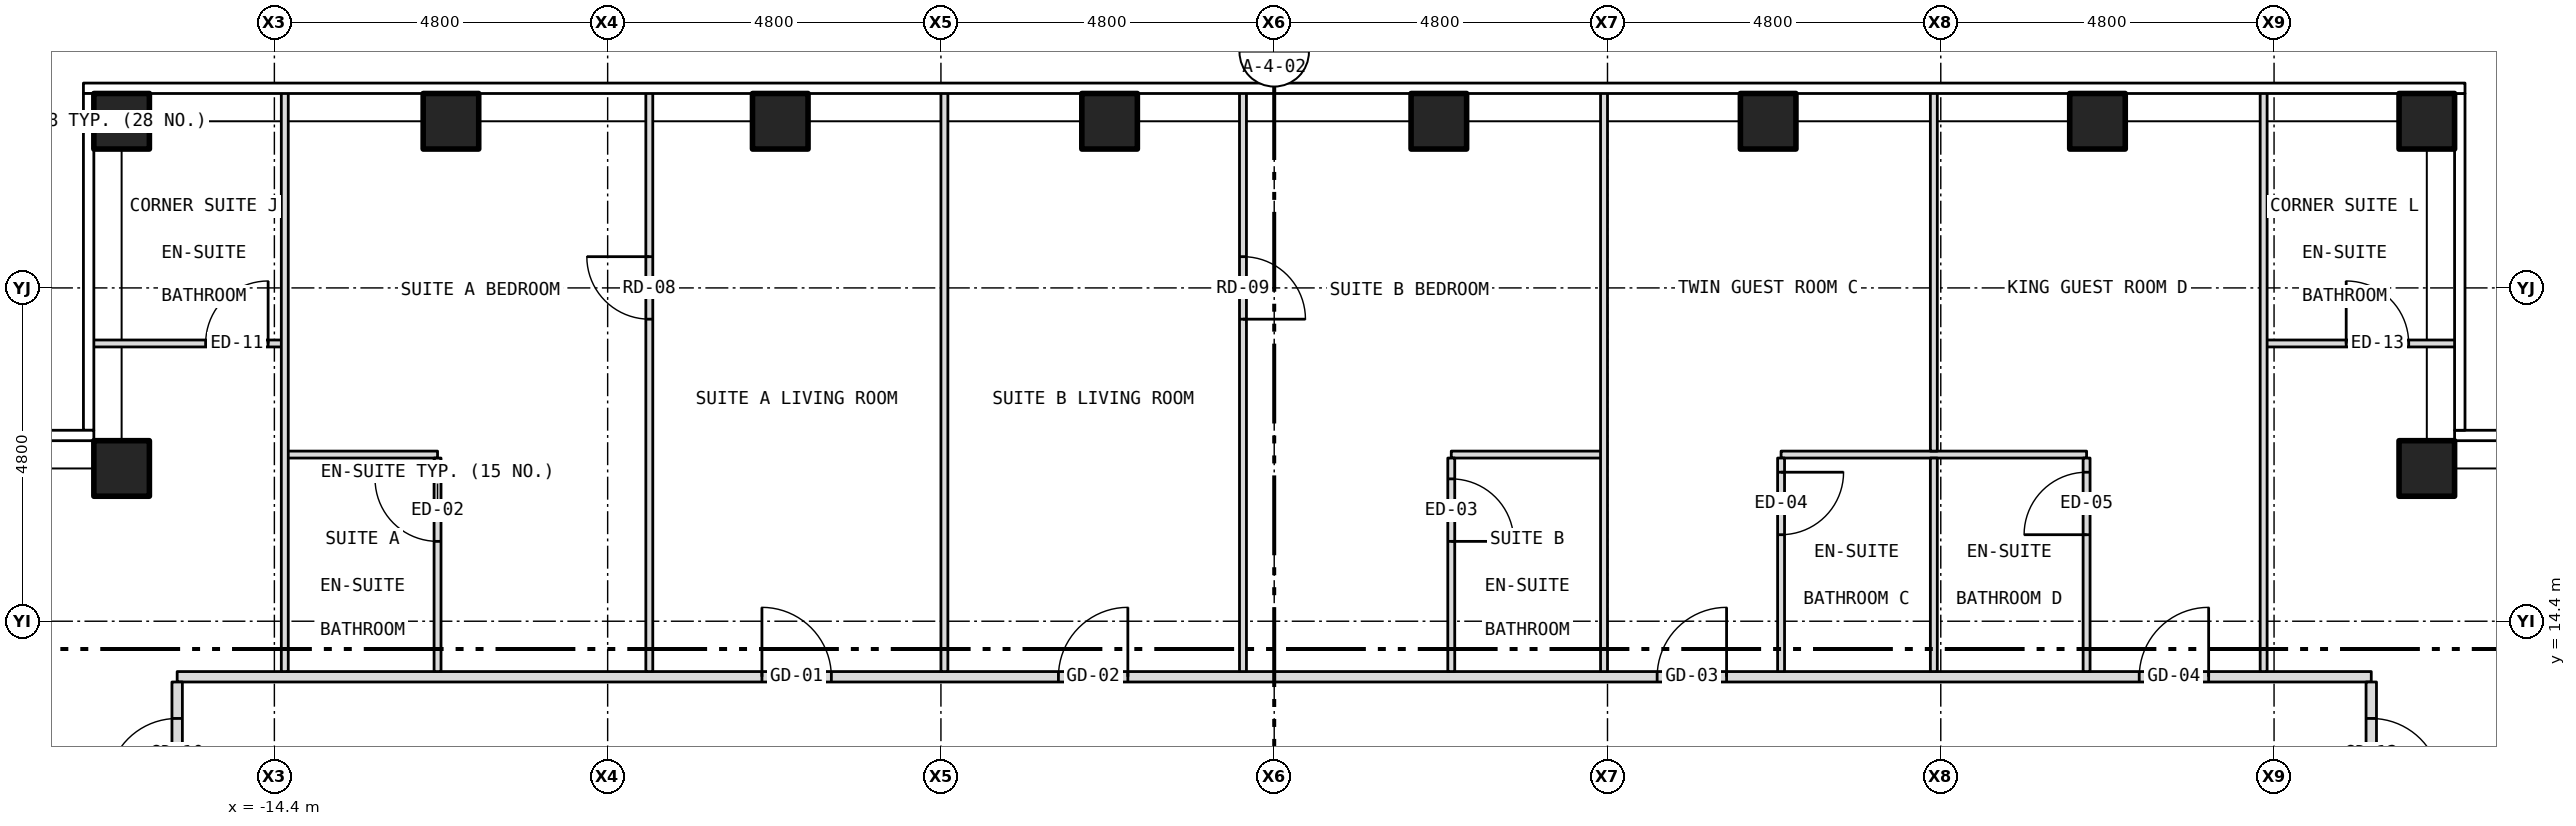
"""IFC4 building model, lengths in metres.
Left out: names, types, materials, properties, quantities, classifications, styles, units other than length and angle.
Written with IfcOpenShell. Run it as: python <this file> out.ifc"""

import sys

from ifc_helpers import new_model, si_unit, direction, frame, frame_2d, origin, origin_2d, place, context, subcontext, project, spatial, rectangle, hollow_rectangle, extrude, element, fill, save


model = new_model("IFC4")
c1 = context("Model", 3, precision=1e-05, world=origin(), true_north=direction((0.0, 1.0)))
c2 = subcontext(c1, "Body", "Model", "MODEL_VIEW")
j1 = project(units=[si_unit("LENGTHUNIT", "METRE"), si_unit("PLANEANGLEUNIT", "RADIAN")], contexts=[c1])
p1 = place(None, origin())
s1 = spatial("IfcSite", under=j1, at=p1, CompositionType="ELEMENT")
p2 = place(p1, origin())
s2 = spatial("IfcBuilding", under=s1, at=p2, CompositionType="ELEMENT")
p3 = place(p2, frame((0.0, 0.0, 158.5)))
s3 = spatial("IfcBuildingStorey", under=s2, at=p3, CompositionType="ELEMENT", Elevation=158.5)
for number, where, z_axis, x_axis in (
    (1, (-16.6, 21.6, -0.15), (0.0, 0.0, 1.0), (1.0, 0.0, 0.0)),
    (2, (-11.857, 21.6, -0.15), (0.0, 0.0, 1.0), (1.0, 0.0, 0.0)),
    (3, (-7.114, 21.6, -0.15), (0.0, 0.0, 1.0), (1.0, 0.0, 0.0)),
    (4, (-2.371, 21.6, -0.15), (0.0, 0.0, 1.0), (1.0, 0.0, 0.0)),
    (5, (2.371, 21.6, -0.15), (0.0, 0.0, 1.0), (1.0, 0.0, 0.0)),
    (6, (7.114, 21.6, -0.15), (0.0, 0.0, 1.0), (1.0, 0.0, 0.0)),
    (7, (11.857, 21.6, -0.15), (0.0, 0.0, 1.0), (1.0, 0.0, 0.0)),
    (8, (16.6, 21.6, -0.15), (0.0, 0.0, 1.0), (1.0, 0.0, 0.0)),
    (9, (-16.6, 16.6, -0.15), (0.0, 0.0, 1.0), (1.0, 0.0, 0.0)),
    (10, (16.6, 16.6, -0.15), (0.0, 0.0, 1.0), (1.0, 0.0, 0.0)),
):
    element("IfcColumn", number, at=place(p3, frame(where, z_axis=z_axis, x_axis=x_axis)), inside=s3, PredefinedType="COLUMN", context=c2, shape_type="SweptSolid", body=[
        extrude(hollow_rectangle(XDim=0.8, YDim=0.8, WallThickness=0.045, at=origin_2d()), origin(), (0.0, 0.0, 1.0), 3.5),
    ])
p4 = place(p3, frame((-15.8, 13.6, 0.0), z_axis=(0.0, 0.0, 1.0), x_axis=(1.0, 0.0, 0.0)))
e11 = element("IfcWall", 11, at=p4, inside=s3, PredefinedType="PARTITIONING", context=c2, shape_type="SweptSolid", body=[
    extrude(rectangle(XDim=31.6, YDim=0.15, at=frame_2d((15.8, 0.0))), origin(), (0.0, 0.0, 1.0), 3.35),
])
p5 = place(p4, frame((8.422, 0.0, 0.0)))
e12 = element("IfcOpeningElement", 12, at=p5, cuts=e11, PredefinedType="OPENING", context=c2, shape_type="SweptSolid", body=[
    extrude(rectangle(XDim=1.0, YDim=2.1, at=frame_2d((0.5, 1.05))), frame((0.0, 0.087, 0.0), z_axis=(0.0, -1.0, 0.0), x_axis=(1.0, 0.0, 0.0)), (0.0, 0.0, 1.0), 0.174),
])
p6 = place(p4, frame((12.692, 0.0, 0.0)))
e13 = element("IfcOpeningElement", 13, at=p6, cuts=e11, PredefinedType="OPENING", context=c2, shape_type="SweptSolid", body=[
    extrude(rectangle(XDim=1.0, YDim=2.1, at=frame_2d((0.5, 1.05))), frame((0.0, 0.087, 0.0), z_axis=(0.0, -1.0, 0.0), x_axis=(1.0, 0.0, 0.0)), (0.0, 0.0, 1.0), 0.174),
])
p7 = place(p4, frame((21.315, 0.0, 0.0)))
e14 = element("IfcOpeningElement", 14, at=p7, cuts=e11, PredefinedType="OPENING", context=c2, shape_type="SweptSolid", body=[
    extrude(rectangle(XDim=1.0, YDim=2.1, at=frame_2d((0.5, 1.05))), frame((0.0, 0.087, 0.0), z_axis=(0.0, -1.0, 0.0), x_axis=(1.0, 0.0, 0.0)), (0.0, 0.0, 1.0), 0.174),
])
p8 = place(p4, frame((28.258, 0.0, 0.0)))
e15 = element("IfcOpeningElement", 15, at=p8, cuts=e11, PredefinedType="OPENING", context=c2, shape_type="SweptSolid", body=[
    extrude(rectangle(XDim=1.0, YDim=2.1, at=frame_2d((0.5, 1.05))), frame((0.0, 0.087, 0.0), z_axis=(0.0, -1.0, 0.0), x_axis=(1.0, 0.0, 0.0)), (0.0, 0.0, 1.0), 0.174),
])
for number, where, z_axis, x_axis in (
    (16, (-14.25, 16.8, 0.0), (0.0, 0.0, 1.0), (1.0, 0.0, 0.0)),
    (17, (2.55, 16.8, 0.0), (0.0, 0.0, 1.0), (1.0, 0.0, 0.0)),
):
    element("IfcWall", number, at=place(p3, frame(where, z_axis=z_axis, x_axis=x_axis)), inside=s3, PredefinedType="PARTITIONING", context=c2, shape_type="SweptSolid", body=[
        extrude(rectangle(XDim=2.2, YDim=0.1, at=frame_2d((1.1, 0.0))), origin(), (0.0, 0.0, 1.0), 3.35),
    ])
p9 = place(p3, frame((7.3, 16.8, 0.0), z_axis=(0.0, 0.0, 1.0), x_axis=(1.0, 0.0, 0.0)))
e18 = element("IfcWall", 18, at=p9, inside=s3, PredefinedType="PARTITIONING", context=c2, shape_type="SweptSolid", body=[
    extrude(rectangle(XDim=4.4, YDim=0.1, at=frame_2d((2.2, 0.0))), origin(), (0.0, 0.0, 1.0), 3.35),
])
p10 = place(p3, frame((-17.03, 18.4, 0.0), z_axis=(0.0, 0.0, 1.0), x_axis=(1.0, 0.0, 0.0)))
e19 = element("IfcWall", 19, at=p10, inside=s3, PredefinedType="PARTITIONING", context=c2, shape_type="SweptSolid", body=[
    extrude(rectangle(XDim=2.78, YDim=0.1, at=frame_2d((1.39, 0.0))), origin(), (0.0, 0.0, 1.0), 3.35),
])
p11 = place(p10, frame((1.64, 0.0, 0.0)))
e20 = element("IfcOpeningElement", 20, at=p11, cuts=e19, PredefinedType="OPENING", context=c2, shape_type="SweptSolid", body=[
    extrude(rectangle(XDim=0.9, YDim=2.1, at=frame_2d((0.45, 1.05))), frame((0.0, 0.062, 0.0), z_axis=(0.0, -1.0, 0.0), x_axis=(1.0, 0.0, 0.0)), (0.0, 0.0, 1.0), 0.124),
])
p12 = place(p3, frame((14.25, 18.4, 0.0), z_axis=(0.0, 0.0, 1.0), x_axis=(1.0, 0.0, 0.0)))
e21 = element("IfcWall", 21, at=p12, inside=s3, PredefinedType="PARTITIONING", context=c2, shape_type="SweptSolid", body=[
    extrude(rectangle(XDim=2.78, YDim=0.1, at=frame_2d((1.39, 0.0))), origin(), (0.0, 0.0, 1.0), 3.35),
])
p13 = place(p12, frame((1.189, 0.0, 0.0)))
e22 = element("IfcOpeningElement", 22, at=p13, cuts=e21, PredefinedType="OPENING", context=c2, shape_type="SweptSolid", body=[
    extrude(rectangle(XDim=0.9, YDim=2.1, at=frame_2d((0.45, 1.05))), frame((0.0, 0.062, 0.0), z_axis=(0.0, -1.0, 0.0), x_axis=(1.0, 0.0, 0.0)), (0.0, 0.0, 1.0), 0.124),
])
p14 = place(p3, frame((-15.8, 10.92, 0.0), z_axis=(0.0, 0.0, 1.0), x_axis=(0.0, 1.0, 0.0)))
e23 = element("IfcWall", 23, at=p14, inside=s3, PredefinedType="PARTITIONING", context=c2, shape_type="SweptSolid", body=[
    extrude(rectangle(XDim=2.605, YDim=0.15, at=frame_2d((1.302, 0.0))), origin(), (0.0, 0.0, 1.0), 3.35),
])
p15 = place(p14, frame((1.08, 0.0, 0.0)))
e24 = element("IfcOpeningElement", 24, at=p15, cuts=e23, PredefinedType="OPENING", context=c2, shape_type="SweptSolid", body=[
    extrude(rectangle(XDim=1.0, YDim=2.1, at=frame_2d((0.5, 1.05))), frame((0.0, 0.087, 0.0), z_axis=(0.0, -1.0, 0.0), x_axis=(1.0, 0.0, 0.0)), (0.0, 0.0, 1.0), 0.174),
])
p16 = place(p3, frame((-14.25, 13.675, 0.0), z_axis=(0.0, 0.0, 1.0), x_axis=(0.0, 1.0, 0.0)))
e25 = element("IfcWall", 25, at=p16, inside=s3, PredefinedType="PARTITIONING", context=c2, shape_type="SweptSolid", body=[
    extrude(rectangle(XDim=8.355, YDim=0.1, at=frame_2d((4.177, 0.0))), origin(), (0.0, 0.0, 1.0), 2.817),
])
p17 = place(p3, frame((-12.05, 13.675, 0.0), z_axis=(0.0, 0.0, 1.0), x_axis=(0.0, 1.0, 0.0)))
e26 = element("IfcWall", 26, at=p17, inside=s3, PredefinedType="PARTITIONING", context=c2, shape_type="SweptSolid", body=[
    extrude(rectangle(XDim=3.075, YDim=0.1, at=frame_2d((1.538, 0.0))), origin(), (0.0, 0.0, 1.0), 3.35),
])
p18 = place(p17, frame((1.875, 0.0, 0.0)))
e27 = element("IfcOpeningElement", 27, at=p18, cuts=e26, PredefinedType="OPENING", context=c2, shape_type="SweptSolid", body=[
    extrude(rectangle(XDim=0.9, YDim=2.1, at=frame_2d((0.45, 1.05))), frame((0.0, 0.062, 0.0), z_axis=(0.0, -1.0, 0.0), x_axis=(1.0, 0.0, 0.0)), (0.0, 0.0, 1.0), 0.124),
])
p19 = place(p3, frame((-9.0, 13.675, 0.0), z_axis=(0.0, 0.0, 1.0), x_axis=(0.0, 1.0, 0.0)))
e28 = element("IfcWall", 28, at=p19, inside=s3, PredefinedType="PARTITIONING", context=c2, shape_type="SweptSolid", body=[
    extrude(rectangle(XDim=8.355, YDim=0.1, at=frame_2d((4.177, 0.0))), origin(), (0.0, 0.0, 1.0), 3.35),
])
p20 = place(p19, frame((5.075, 0.0, 0.0)))
e29 = element("IfcOpeningElement", 29, at=p20, cuts=e28, PredefinedType="OPENING", context=c2, shape_type="SweptSolid", body=[
    extrude(rectangle(XDim=0.9, YDim=2.1, at=frame_2d((0.45, 1.05))), frame((0.0, 0.062, 0.0), z_axis=(0.0, -1.0, 0.0), x_axis=(1.0, 0.0, 0.0)), (0.0, 0.0, 1.0), 0.124),
])
p21 = place(p3, frame((-4.75, 13.675, 0.0), z_axis=(0.0, 0.0, 1.0), x_axis=(0.0, 1.0, 0.0)))
e30 = element("IfcWall", 30, at=p21, inside=s3, PredefinedType="PARTITIONING", context=c2, shape_type="SweptSolid", body=[
    extrude(rectangle(XDim=8.355, YDim=0.1, at=frame_2d((4.177, 0.0))), origin(), (0.0, 0.0, 1.0), 2.817),
])
p22 = place(p3, frame((-0.45, 13.675, 0.0), z_axis=(0.0, 0.0, 1.0), x_axis=(0.0, 1.0, 0.0)))
e31 = element("IfcWall", 31, at=p22, inside=s3, PredefinedType="PARTITIONING", context=c2, shape_type="SweptSolid", body=[
    extrude(rectangle(XDim=8.355, YDim=0.1, at=frame_2d((4.177, 0.0))), origin(), (0.0, 0.0, 1.0), 3.35),
])
p23 = place(p22, frame((5.075, 0.0, 0.0)))
e32 = element("IfcOpeningElement", 32, at=p23, cuts=e31, PredefinedType="OPENING", context=c2, shape_type="SweptSolid", body=[
    extrude(rectangle(XDim=0.9, YDim=2.1, at=frame_2d((0.45, 1.05))), frame((0.0, 0.062, 0.0), z_axis=(0.0, -1.0, 0.0), x_axis=(1.0, 0.0, 0.0)), (0.0, 0.0, 1.0), 0.124),
])
p24 = place(p3, frame((2.55, 13.675, 0.0), z_axis=(0.0, 0.0, 1.0), x_axis=(0.0, 1.0, 0.0)))
e33 = element("IfcWall", 33, at=p24, inside=s3, PredefinedType="PARTITIONING", context=c2, shape_type="SweptSolid", body=[
    extrude(rectangle(XDim=3.075, YDim=0.1, at=frame_2d((1.538, 0.0))), origin(), (0.0, 0.0, 1.0), 3.35),
])
p25 = place(p24, frame((1.875, 0.0, 0.0)))
e34 = element("IfcOpeningElement", 34, at=p25, cuts=e33, PredefinedType="OPENING", context=c2, shape_type="SweptSolid", body=[
    extrude(rectangle(XDim=0.9, YDim=2.1, at=frame_2d((0.45, 1.05))), frame((0.0, 0.062, 0.0), z_axis=(0.0, -1.0, 0.0), x_axis=(1.0, 0.0, 0.0)), (0.0, 0.0, 1.0), 0.124),
])
p26 = place(p3, frame((4.75, 13.675, 0.0), z_axis=(0.0, 0.0, 1.0), x_axis=(0.0, 1.0, 0.0)))
e35 = element("IfcWall", 35, at=p26, inside=s3, PredefinedType="PARTITIONING", context=c2, shape_type="SweptSolid", body=[
    extrude(rectangle(XDim=8.355, YDim=0.1, at=frame_2d((4.177, 0.0))), origin(), (0.0, 0.0, 1.0), 2.817),
])
p27 = place(p3, frame((7.3, 13.675, 0.0), z_axis=(0.0, 0.0, 1.0), x_axis=(0.0, 1.0, 0.0)))
e36 = element("IfcWall", 36, at=p27, inside=s3, PredefinedType="PARTITIONING", context=c2, shape_type="SweptSolid", body=[
    extrude(rectangle(XDim=3.075, YDim=0.1, at=frame_2d((1.538, 0.0))), origin(), (0.0, 0.0, 1.0), 3.35),
])
p28 = place(p27, frame((1.971, 0.0, 0.0)))
e37 = element("IfcOpeningElement", 37, at=p28, cuts=e36, PredefinedType="OPENING", context=c2, shape_type="SweptSolid", body=[
    extrude(rectangle(XDim=0.9, YDim=2.1, at=frame_2d((0.45, 1.05))), frame((0.0, 0.062, 0.0), z_axis=(0.0, -1.0, 0.0), x_axis=(1.0, 0.0, 0.0)), (0.0, 0.0, 1.0), 0.124),
])
p29 = place(p3, frame((9.5, 13.675, 0.0), z_axis=(0.0, 0.0, 1.0), x_axis=(0.0, 1.0, 0.0)))
e38 = element("IfcWall", 38, at=p29, inside=s3, PredefinedType="PARTITIONING", context=c2, shape_type="SweptSolid", body=[
    extrude(rectangle(XDim=3.075, YDim=0.1, at=frame_2d((1.538, 0.0))), origin(), (0.0, 0.0, 1.0), 2.728),
])
p30 = place(p3, frame((9.5, 16.85, 0.0), z_axis=(0.0, 0.0, 1.0), x_axis=(0.0, 1.0, 0.0)))
e39 = element("IfcWall", 39, at=p30, inside=s3, PredefinedType="PARTITIONING", context=c2, shape_type="SweptSolid", body=[
    extrude(rectangle(XDim=5.18, YDim=0.1, at=frame_2d((2.59, 0.0))), origin(), (0.0, 0.0, 1.0), 2.728),
])
p31 = place(p3, frame((11.7, 13.675, 0.0), z_axis=(0.0, 0.0, 1.0), x_axis=(0.0, 1.0, 0.0)))
e40 = element("IfcWall", 40, at=p31, inside=s3, PredefinedType="PARTITIONING", context=c2, shape_type="SweptSolid", body=[
    extrude(rectangle(XDim=3.075, YDim=0.1, at=frame_2d((1.538, 0.0))), origin(), (0.0, 0.0, 1.0), 3.35),
])
p32 = place(p31, frame((1.971, 0.0, 0.0)))
e41 = element("IfcOpeningElement", 41, at=p32, cuts=e40, PredefinedType="OPENING", context=c2, shape_type="SweptSolid", body=[
    extrude(rectangle(XDim=0.9, YDim=2.1, at=frame_2d((0.45, 1.05))), frame((0.0, 0.062, 0.0), z_axis=(0.0, -1.0, 0.0), x_axis=(1.0, 0.0, 0.0)), (0.0, 0.0, 1.0), 0.124),
])
p33 = place(p3, frame((14.25, 13.675, 0.0), z_axis=(0.0, 0.0, 1.0), x_axis=(0.0, 1.0, 0.0)))
e42 = element("IfcWall", 42, at=p33, inside=s3, PredefinedType="PARTITIONING", context=c2, shape_type="SweptSolid", body=[
    extrude(rectangle(XDim=8.355, YDim=0.1, at=frame_2d((4.177, 0.0))), origin(), (0.0, 0.0, 1.0), 2.817),
])
p34 = place(p3, frame((15.8, 10.92, 0.0), z_axis=(0.0, 0.0, 1.0), x_axis=(0.0, 1.0, 0.0)))
e43 = element("IfcWall", 43, at=p34, inside=s3, PredefinedType="PARTITIONING", context=c2, shape_type="SweptSolid", body=[
    extrude(rectangle(XDim=2.605, YDim=0.15, at=frame_2d((1.302, 0.0))), origin(), (0.0, 0.0, 1.0), 3.35),
])
p35 = place(p34, frame((1.08, 0.0, 0.0)))
e44 = element("IfcOpeningElement", 44, at=p35, cuts=e43, PredefinedType="OPENING", context=c2, shape_type="SweptSolid", body=[
    extrude(rectangle(XDim=1.0, YDim=2.1, at=frame_2d((0.5, 1.05))), frame((0.0, 0.087, 0.0), z_axis=(0.0, -1.0, 0.0), x_axis=(1.0, 0.0, 0.0)), (0.0, 0.0, 1.0), 0.174),
])
p36 = place(p5, origin())
e45 = element("IfcDoor", 45, at=p36, inside=s3, OperationType="SINGLE_SWING_LEFT", PredefinedType="DOOR", context=c2, shape_type="SweptSolid", body=[
    extrude(rectangle(XDim=1.0, YDim=2.1, at=frame_2d((0.5, 1.05))), frame((0.0, 0.025, 0.0), z_axis=(0.0, -1.0, 0.0), x_axis=(1.0, 0.0, 0.0)), (0.0, 0.0, 1.0), 0.05),
])
fill(e12, e45)
p37 = place(p20, origin())
e46 = element("IfcDoor", 46, at=p37, inside=s3, OperationType="SINGLE_SWING_RIGHT", PredefinedType="DOOR", context=c2, shape_type="SweptSolid", body=[
    extrude(rectangle(XDim=0.9, YDim=2.1, at=frame_2d((0.45, 1.05))), frame((0.0, 0.025, 0.0), z_axis=(0.0, -1.0, 0.0), x_axis=(1.0, 0.0, 0.0)), (0.0, 0.0, 1.0), 0.05),
])
fill(e29, e46)
p38 = place(p18, origin())
e47 = element("IfcDoor", 47, at=p38, inside=s3, OperationType="SINGLE_SWING_RIGHT", PredefinedType="DOOR", context=c2, shape_type="SweptSolid", body=[
    extrude(rectangle(XDim=0.9, YDim=2.1, at=frame_2d((0.45, 1.05))), frame((0.0, 0.025, 0.0), z_axis=(0.0, -1.0, 0.0), x_axis=(1.0, 0.0, 0.0)), (0.0, 0.0, 1.0), 0.05),
])
fill(e27, e47)
p39 = place(p6, origin())
e48 = element("IfcDoor", 48, at=p39, inside=s3, OperationType="SINGLE_SWING_RIGHT", PredefinedType="DOOR", context=c2, shape_type="SweptSolid", body=[
    extrude(rectangle(XDim=1.0, YDim=2.1, at=frame_2d((0.5, 1.05))), frame((0.0, 0.025, 0.0), z_axis=(0.0, -1.0, 0.0), x_axis=(1.0, 0.0, 0.0)), (0.0, 0.0, 1.0), 0.05),
])
fill(e13, e48)
p40 = place(p23, origin())
e49 = element("IfcDoor", 49, at=p40, inside=s3, OperationType="SINGLE_SWING_LEFT", PredefinedType="DOOR", context=c2, shape_type="SweptSolid", body=[
    extrude(rectangle(XDim=0.9, YDim=2.1, at=frame_2d((0.45, 1.05))), frame((0.0, 0.025, 0.0), z_axis=(0.0, -1.0, 0.0), x_axis=(1.0, 0.0, 0.0)), (0.0, 0.0, 1.0), 0.05),
])
fill(e32, e49)
p41 = place(p25, origin())
e50 = element("IfcDoor", 50, at=p41, inside=s3, OperationType="SINGLE_SWING_LEFT", PredefinedType="DOOR", context=c2, shape_type="SweptSolid", body=[
    extrude(rectangle(XDim=0.9, YDim=2.1, at=frame_2d((0.45, 1.05))), frame((0.0, 0.025, 0.0), z_axis=(0.0, -1.0, 0.0), x_axis=(1.0, 0.0, 0.0)), (0.0, 0.0, 1.0), 0.05),
])
fill(e34, e50)
p42 = place(p7, origin())
e51 = element("IfcDoor", 51, at=p42, inside=s3, OperationType="SINGLE_SWING_RIGHT", PredefinedType="DOOR", context=c2, shape_type="SweptSolid", body=[
    extrude(rectangle(XDim=1.0, YDim=2.1, at=frame_2d((0.5, 1.05))), frame((0.0, 0.025, 0.0), z_axis=(0.0, -1.0, 0.0), x_axis=(1.0, 0.0, 0.0)), (0.0, 0.0, 1.0), 0.05),
])
fill(e14, e51)
p43 = place(p28, origin())
e52 = element("IfcDoor", 52, at=p43, inside=s3, OperationType="SINGLE_SWING_RIGHT", PredefinedType="DOOR", context=c2, shape_type="SweptSolid", body=[
    extrude(rectangle(XDim=0.9, YDim=2.1, at=frame_2d((0.45, 1.05))), frame((0.0, 0.025, 0.0), z_axis=(0.0, -1.0, 0.0), x_axis=(1.0, 0.0, 0.0)), (0.0, 0.0, 1.0), 0.05),
])
fill(e37, e52)
p44 = place(p8, origin())
e53 = element("IfcDoor", 53, at=p44, inside=s3, OperationType="SINGLE_SWING_RIGHT", PredefinedType="DOOR", context=c2, shape_type="SweptSolid", body=[
    extrude(rectangle(XDim=1.0, YDim=2.1, at=frame_2d((0.5, 1.05))), frame((0.0, 0.025, 0.0), z_axis=(0.0, -1.0, 0.0), x_axis=(1.0, 0.0, 0.0)), (0.0, 0.0, 1.0), 0.05),
])
fill(e15, e53)
p45 = place(p32, origin())
e54 = element("IfcDoor", 54, at=p45, inside=s3, OperationType="SINGLE_SWING_LEFT", PredefinedType="DOOR", context=c2, shape_type="SweptSolid", body=[
    extrude(rectangle(XDim=0.9, YDim=2.1, at=frame_2d((0.45, 1.05))), frame((0.0, 0.025, 0.0), z_axis=(0.0, -1.0, 0.0), x_axis=(1.0, 0.0, 0.0)), (0.0, 0.0, 1.0), 0.05),
])
fill(e41, e54)
p46 = place(p11, origin())
e55 = element("IfcDoor", 55, at=p46, inside=s3, OperationType="SINGLE_SWING_RIGHT", PredefinedType="DOOR", context=c2, shape_type="SweptSolid", body=[
    extrude(rectangle(XDim=0.9, YDim=2.1, at=frame_2d((0.45, 1.05))), frame((0.0, 0.025, 0.0), z_axis=(0.0, -1.0, 0.0), x_axis=(1.0, 0.0, 0.0)), (0.0, 0.0, 1.0), 0.05),
])
fill(e20, e55)
p47 = place(p15, origin())
e56 = element("IfcDoor", 56, at=p47, inside=s3, OperationType="SINGLE_SWING_LEFT", PredefinedType="DOOR", context=c2, shape_type="SweptSolid", body=[
    extrude(rectangle(XDim=1.0, YDim=2.1, at=frame_2d((0.5, 1.05))), frame((0.0, 0.025, 0.0), z_axis=(0.0, -1.0, 0.0), x_axis=(1.0, 0.0, 0.0)), (0.0, 0.0, 1.0), 0.05),
])
fill(e24, e56)
p48 = place(p13, origin())
e57 = element("IfcDoor", 57, at=p48, inside=s3, OperationType="SINGLE_SWING_LEFT", PredefinedType="DOOR", context=c2, shape_type="SweptSolid", body=[
    extrude(rectangle(XDim=0.9, YDim=2.1, at=frame_2d((0.45, 1.05))), frame((0.0, 0.025, 0.0), z_axis=(0.0, -1.0, 0.0), x_axis=(1.0, 0.0, 0.0)), (0.0, 0.0, 1.0), 0.05),
])
fill(e22, e57)
p49 = place(p35, origin())
e58 = element("IfcDoor", 58, at=p49, inside=s3, OperationType="SINGLE_SWING_LEFT", PredefinedType="DOOR", context=c2, shape_type="SweptSolid", body=[
    extrude(rectangle(XDim=1.0, YDim=2.1, at=frame_2d((0.5, 1.05))), frame((0.0, 0.025, 0.0), z_axis=(0.0, -1.0, 0.0), x_axis=(1.0, 0.0, 0.0)), (0.0, 0.0, 1.0), 0.05),
])
fill(e44, e58)
save(model, sys.argv[1])
